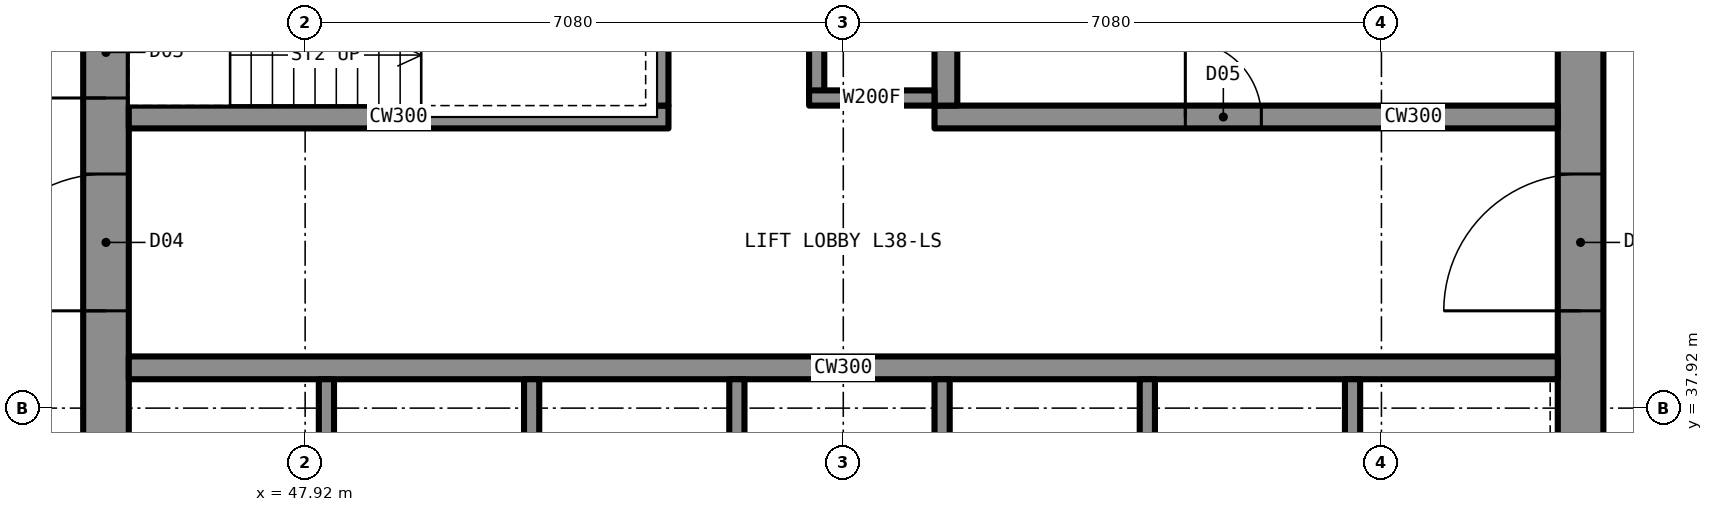
"""IFC4 building model, lengths in metres.
Left out: names, types, materials, properties, quantities, classifications, styles, units other than length and angle.
Written with IfcOpenShell. Run it as: python <this file> out.ifc"""

import sys

from ifc_helpers import new_model, si_unit, direction, frame, frame_2d, origin, place, context, subcontext, project, spatial, rectangle, extrude, element, fill, save


model = new_model("IFC4")
c1 = context("Model", 3, precision=1e-05, world=origin(), true_north=direction((0.0, 1.0)))
c2 = subcontext(c1, "Body", "Model", "MODEL_VIEW")
j1 = project(units=[si_unit("LENGTHUNIT", "METRE"), si_unit("PLANEANGLEUNIT", "RADIAN")], contexts=[c1])
p1 = place(None, origin())
s1 = spatial("IfcSite", under=j1, at=p1, CompositionType="ELEMENT")
p2 = place(p1, origin())
s2 = spatial("IfcBuilding", under=s1, at=p2, CompositionType="ELEMENT")
p3 = place(p2, frame((0.0, 0.0, 135.4)))
s3 = spatial("IfcBuildingStorey", under=s2, at=p3, CompositionType="ELEMENT", Elevation=135.4)
p4 = place(p3, frame((64.7, 35.6, 0.0), z_axis=(0.0, 0.0, 1.0), x_axis=(0.0, 1.0, 0.0)))
e1 = element("IfcWall", 1, at=p4, inside=s3, PredefinedType="SHEAR", context=c2, shape_type="SweptSolid", body=[
    extrude(rectangle(XDim=18.8, YDim=0.6, at=frame_2d((9.4, 0.0))), origin(), (0.0, 0.0, 1.0), 3.5),
])
p5 = place(p4, frame((13.4, 0.0, 0.0)))
e2 = element("IfcOpeningElement", 2, at=p5, cuts=e1, PredefinedType="OPENING", context=c2, shape_type="SweptSolid", body=[
    extrude(rectangle(XDim=1.8, YDim=2.2, at=frame_2d((0.9, 1.1))), frame((0.0, 0.31, 0.0), z_axis=(0.0, -1.0, 0.0), x_axis=(1.0, 0.0, 0.0)), (0.0, 0.0, 1.0), 0.62),
])
p6 = place(p4, frame((3.6, 0.0, 0.0)))
e3 = element("IfcOpeningElement", 3, at=p6, cuts=e1, PredefinedType="OPENING", context=c2, shape_type="SweptSolid", body=[
    extrude(rectangle(XDim=1.8, YDim=2.2, at=frame_2d((0.9, 1.1))), frame((0.0, 0.31, 0.0), z_axis=(0.0, -1.0, 0.0), x_axis=(1.0, 0.0, 0.0)), (0.0, 0.0, 1.0), 0.62),
])
p7 = place(p3, frame((45.3, 35.6, 0.0), z_axis=(0.0, 0.0, 1.0), x_axis=(0.0, 1.0, 0.0)))
e4 = element("IfcWall", 4, at=p7, inside=s3, PredefinedType="SHEAR", context=c2, shape_type="SweptSolid", body=[
    extrude(rectangle(XDim=18.8, YDim=0.6, at=frame_2d((9.4, 0.0))), origin(), (0.0, 0.0, 1.0), 3.5),
])
p8 = place(p7, frame((13.4, 0.0, 0.0)))
e5 = element("IfcOpeningElement", 5, at=p8, cuts=e4, PredefinedType="OPENING", context=c2, shape_type="SweptSolid", body=[
    extrude(rectangle(XDim=1.8, YDim=2.2, at=frame_2d((0.9, 1.1))), frame((0.0, 0.31, 0.0), z_axis=(0.0, -1.0, 0.0), x_axis=(1.0, 0.0, 0.0)), (0.0, 0.0, 1.0), 0.62),
])
p9 = place(p7, frame((3.6, 0.0, 0.0)))
e6 = element("IfcOpeningElement", 6, at=p9, cuts=e4, PredefinedType="OPENING", context=c2, shape_type="SweptSolid", body=[
    extrude(rectangle(XDim=1.8, YDim=2.2, at=frame_2d((0.9, 1.1))), frame((0.0, 0.31, 0.0), z_axis=(0.0, -1.0, 0.0), x_axis=(1.0, 0.0, 0.0)), (0.0, 0.0, 1.0), 0.62),
])
p10 = place(p7, frame((6.4, 0.0, 0.0)))
e7 = element("IfcOpeningElement", 7, at=p10, cuts=e4, PredefinedType="OPENING", context=c2, shape_type="SweptSolid", body=[
    extrude(rectangle(XDim=1.2, YDim=2.2, at=frame_2d((0.6, 1.1))), frame((0.0, 0.31, 0.0), z_axis=(0.0, -1.0, 0.0), x_axis=(1.0, 0.0, 0.0)), (0.0, 0.0, 1.0), 0.62),
])
p11 = place(p3, frame((45.6, 38.45, 0.0), z_axis=(0.0, 0.0, 1.0), x_axis=(1.0, 0.0, 0.0)))
e8 = element("IfcWall", 8, at=p11, inside=s3, PredefinedType="SHEAR", context=c2, shape_type="SweptSolid", body=[
    extrude(rectangle(XDim=18.8, YDim=0.3, at=frame_2d((9.4, 0.0))), origin(), (0.0, 0.0, 1.0), 3.5),
])
p12 = place(p3, frame((45.6, 41.75, 0.0), z_axis=(0.0, 0.0, 1.0), x_axis=(1.0, 0.0, 0.0)))
e9 = element("IfcWall", 9, at=p12, inside=s3, PredefinedType="SHEAR", context=c2, shape_type="SweptSolid", body=[
    extrude(rectangle(XDim=7.1, YDim=0.3, at=frame_2d((3.55, 0.0))), origin(), (0.0, 0.0, 1.0), 3.5),
])
p13 = place(p3, frame((56.2, 41.75, 0.0), z_axis=(0.0, 0.0, 1.0), x_axis=(1.0, 0.0, 0.0)))
e10 = element("IfcWall", 10, at=p13, inside=s3, PredefinedType="SHEAR", context=c2, shape_type="SweptSolid", body=[
    extrude(rectangle(XDim=8.2, YDim=0.3, at=frame_2d((4.1, 0.0))), origin(), (0.0, 0.0, 1.0), 3.5),
])
p14 = place(p13, frame((3.3, 0.0, 0.0)))
e11 = element("IfcOpeningElement", 11, at=p14, cuts=e10, PredefinedType="OPENING", context=c2, shape_type="SweptSolid", body=[
    extrude(rectangle(XDim=1.0, YDim=2.1, at=frame_2d((0.5, 1.05))), frame((0.0, 0.16, 0.0), z_axis=(0.0, -1.0, 0.0), x_axis=(1.0, 0.0, 0.0)), (0.0, 0.0, 1.0), 0.32),
])
p15 = place(p3, frame((52.55, 41.9, 0.0), z_axis=(0.0, 0.0, 1.0), x_axis=(0.0, 1.0, 0.0)))
e12 = element("IfcWall", 12, at=p15, inside=s3, PredefinedType="SHEAR", context=c2, shape_type="SweptSolid", body=[
    extrude(rectangle(XDim=6.2, YDim=0.3, at=frame_2d((3.1, 0.0))), origin(), (0.0, 0.0, 1.0), 3.5),
])
p16 = place(p15, frame((4.125, 0.0, 0.0)))
e13 = element("IfcOpeningElement", 13, at=p16, cuts=e12, PredefinedType="OPENING", context=c2, shape_type="SweptSolid", body=[
    extrude(rectangle(XDim=1.2, YDim=2.2, at=frame_2d((0.6, 1.1))), frame((0.0, 0.16, 0.0), z_axis=(0.0, -1.0, 0.0), x_axis=(1.0, 0.0, 0.0)), (0.0, 0.0, 1.0), 0.32),
])
p17 = place(p3, frame((56.35, 41.9, 0.0), z_axis=(0.0, 0.0, 1.0), x_axis=(0.0, 1.0, 0.0)))
e14 = element("IfcWall", 14, at=p17, inside=s3, PredefinedType="SHEAR", context=c2, shape_type="SweptSolid", body=[
    extrude(rectangle(XDim=9.5, YDim=0.3, at=frame_2d((4.75, 0.0))), origin(), (0.0, 0.0, 1.0), 3.5),
])
p18 = place(p17, frame((7.1, 0.0, 0.0)))
e15 = element("IfcOpeningElement", 15, at=p18, cuts=e14, PredefinedType="OPENING", context=c2, shape_type="SweptSolid", body=[
    extrude(rectangle(XDim=1.8, YDim=2.2, at=frame_2d((0.9, 1.1))), frame((0.0, 0.16, 0.0), z_axis=(0.0, -1.0, 0.0), x_axis=(1.0, 0.0, 0.0)), (0.0, 0.0, 1.0), 0.32),
])
for number, where, z_axis, x_axis in (
    (16, (48.2, 35.6, 0.0), (0.0, 0.0, 1.0), (0.0, 1.0, 0.0)),
    (17, (50.9, 35.6, 0.0), (0.0, 0.0, 1.0), (0.0, 1.0, 0.0)),
    (18, (53.6, 35.6, 0.0), (0.0, 0.0, 1.0), (0.0, 1.0, 0.0)),
    (19, (56.3, 35.6, 0.0), (0.0, 0.0, 1.0), (0.0, 1.0, 0.0)),
    (20, (59.0, 35.6, 0.0), (0.0, 0.0, 1.0), (0.0, 1.0, 0.0)),
    (21, (61.7, 35.6, 0.0), (0.0, 0.0, 1.0), (0.0, 1.0, 0.0)),
):
    element("IfcWall", number, at=place(p3, frame(where, z_axis=z_axis, x_axis=x_axis)), inside=s3, PredefinedType="PARTITIONING", context=c2, shape_type="SweptSolid", body=[
        extrude(rectangle(XDim=2.7, YDim=0.2, at=frame_2d((1.35, 0.0))), origin(), (0.0, 0.0, 1.0), 3.33),
    ])
p19 = place(p9, origin())
e22 = element("IfcDoor", 22, at=p19, inside=s3, OperationType="DOUBLE_DOOR_SINGLE_SWING", PredefinedType="DOOR", context=c2, shape_type="SweptSolid", body=[
    extrude(rectangle(XDim=1.8, YDim=2.2, at=frame_2d((0.9, 1.1))), frame((0.0, 0.025, 0.0), z_axis=(0.0, -1.0, 0.0), x_axis=(1.0, 0.0, 0.0)), (0.0, 0.0, 1.0), 0.05),
])
fill(e6, e22)
p20 = place(p6, origin())
e23 = element("IfcDoor", 23, at=p20, inside=s3, OperationType="DOUBLE_DOOR_SINGLE_SWING", PredefinedType="DOOR", context=c2, shape_type="SweptSolid", body=[
    extrude(rectangle(XDim=1.8, YDim=2.2, at=frame_2d((0.9, 1.1))), frame((0.0, 0.025, 0.0), z_axis=(0.0, -1.0, 0.0), x_axis=(1.0, 0.0, 0.0)), (0.0, 0.0, 1.0), 0.05),
])
fill(e3, e23)
p21 = place(p10, origin())
e24 = element("IfcDoor", 24, at=p21, inside=s3, OperationType="SINGLE_SWING_LEFT", PredefinedType="DOOR", context=c2, shape_type="SweptSolid", body=[
    extrude(rectangle(XDim=1.2, YDim=2.2, at=frame_2d((0.6, 1.1))), frame((0.0, 0.025, 0.0), z_axis=(0.0, -1.0, 0.0), x_axis=(1.0, 0.0, 0.0)), (0.0, 0.0, 1.0), 0.05),
])
fill(e7, e24)
p22 = place(p14, origin())
e25 = element("IfcDoor", 25, at=p22, inside=s3, OperationType="SINGLE_SWING_LEFT", PredefinedType="DOOR", context=c2, shape_type="SweptSolid", body=[
    extrude(rectangle(XDim=1.0, YDim=2.1, at=frame_2d((0.5, 1.05))), frame((0.0, 0.025, 0.0), z_axis=(0.0, -1.0, 0.0), x_axis=(1.0, 0.0, 0.0)), (0.0, 0.0, 1.0), 0.05),
])
fill(e11, e25)
save(model, sys.argv[1])
